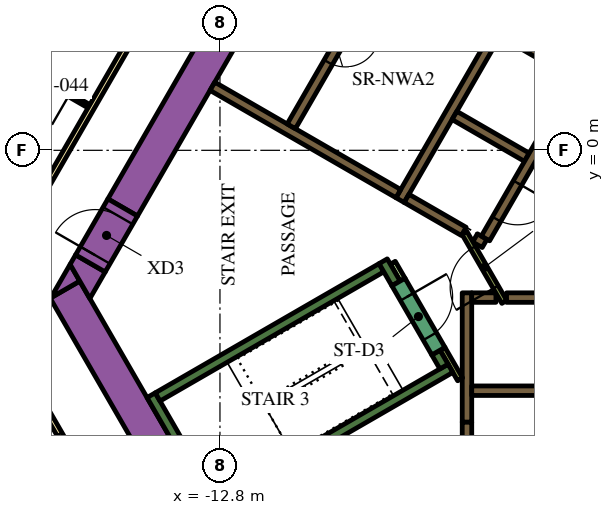
"""IFC4 building model, lengths in metres.
Left out: names, types, materials, properties, quantities, classifications, styles, units other than length and angle.
Written with IfcOpenShell. Run it as: python <this file> out.ifc"""

import sys

from ifc_helpers import new_model, si_unit, direction, frame, frame_2d, origin, place, context, subcontext, project, spatial, polyline, rectangle, outline, extrude, element, fill, save


model = new_model("IFC4")
c1 = context("Model", 3, precision=1e-05, world=origin(), true_north=direction((0.0, 1.0)))
c2 = subcontext(c1, "Body", "Model", "MODEL_VIEW")
j1 = project(units=[si_unit("LENGTHUNIT", "METRE"), si_unit("PLANEANGLEUNIT", "RADIAN")], contexts=[c1])
p1 = place(None, origin())
s1 = spatial("IfcSite", under=j1, at=p1, CompositionType="ELEMENT")
p2 = place(p1, origin())
s2 = spatial("IfcBuilding", under=s1, at=p2, CompositionType="ELEMENT")
p3 = place(p2, frame((0.0, 0.0, 51.0)))
s3 = spatial("IfcBuildingStorey", under=s2, at=p3, CompositionType="ELEMENT", Elevation=51.0)
p4 = place(p3, frame((-15.36, -1.503, 0.0), z_axis=(0.0, 0.0, 1.0), x_axis=(0.50000389221, 0.866023156604, 0.0)))
e1 = element("IfcWall", 1, at=p4, inside=s3, PredefinedType="SOLIDWALL", context=c2, shape_type="SweptSolid", body=[
    extrude(rectangle(XDim=21.0, YDim=0.9, at=frame_2d((10.5, 0.0))), origin(), (0.0, 0.0, 1.0), 3.9),
])
p5 = place(p3, frame((-12.134, -11.883, 0.0), z_axis=(0.0, 0.0, 1.0), x_axis=(-0.500005339912, 0.866022320763, 0.0)))
e2 = element("IfcWall", 2, at=p5, inside=s3, PredefinedType="SOLIDWALL", context=c2, shape_type="SweptSolid", body=[
    extrude(rectangle(XDim=9.488, YDim=0.9, at=frame_2d((4.744, 0.0))), origin(), (0.0, 0.0, 1.0), 3.9),
])
p6 = place(p3, origin())
e3 = element("IfcWall", 3, at=p6, inside=s3, PredefinedType="SOLIDWALL", context=c2, shape_type="SweptSolid", body=[
    extrude(outline(polyline([(-16.489, -3.44), (-17.251, -3.88), (-16.743, -3.0), (-16.489, -3.44)])), origin(), (0.0, 0.0, 1.0), 3.9),
])
e4 = element("IfcWall", 4, at=p6, inside=s3, PredefinedType="SOLIDWALL", context=c2, shape_type="SweptSolid", body=[
    extrude(outline(polyline([(-15.82, -3.201), (-16.223, -3.9), (-16.743, -3.0), (-16.599, -2.751), (-15.82, -3.201)])), origin(), (0.0, 0.0, 1.0), 3.9),
])
p7 = place(p3, frame((-12.885, -9.431, 0.0), z_axis=(0.0, 0.0, 1.0), x_axis=(-0.500020560727, 0.866013532718, 0.0)))
e5 = element("IfcWall", 5, at=p7, inside=s3, PredefinedType="SOLIDWALL", context=c2, shape_type="SweptSolid", body=[
    extrude(rectangle(XDim=3.45, YDim=0.25, at=frame_2d((1.725, 0.0))), origin(), (0.0, 0.0, 1.0), 3.9),
])
p8 = place(p3, frame((-14.44, -6.49, 0.0), z_axis=(0.0, 0.0, 1.0), x_axis=(0.866022966069, 0.500004222222, 0.0)))
e6 = element("IfcWall", 6, at=p8, inside=s3, PredefinedType="SOLIDWALL", context=c2, shape_type="SweptSolid", body=[
    extrude(rectangle(XDim=6.8, YDim=0.25, at=frame_2d((3.4, 0.0))), origin(), (0.0, 0.0, 1.0), 3.9),
])
p9 = place(p3, frame((-8.168, -3.503, 0.0), z_axis=(0.0, 0.0, 1.0), x_axis=(-0.499952099219, 0.866053057547, 0.0)))
e7 = element("IfcWall", 7, at=p9, inside=s3, PredefinedType="SOLIDWALL", context=c2, shape_type="SweptSolid", body=[
    extrude(rectangle(XDim=0.675, YDim=0.25, at=frame_2d((0.337, 0.0))), origin(), (0.0, 0.0, 1.0), 3.9),
])
p10 = place(p3, frame((-12.84, -9.261, 0.0), z_axis=(0.0, 0.0, 1.0), x_axis=(0.866016039709, 0.500016218704, 0.0)))
e8 = element("IfcWall", 8, at=p10, inside=s3, PredefinedType="SOLIDWALL", context=c2, shape_type="SweptSolid", body=[
    extrude(rectangle(XDim=7.05, YDim=0.25, at=frame_2d((3.525, 0.0))), origin(), (0.0, 0.0, 1.0), 3.9),
])
p11 = place(p3, frame((-6.905, -5.69, 0.0), z_axis=(0.0, 0.0, 1.0), x_axis=(-0.500402024738, 0.865793170242, 0.0)))
e9 = element("IfcWall", 9, at=p11, inside=s3, PredefinedType="SOLIDWALL", context=c2, shape_type="SweptSolid", body=[
    extrude(rectangle(XDim=0.425, YDim=0.25, at=frame_2d((0.212, 0.0))), origin(), (0.0, 0.0, 1.0), 3.9),
])
p12 = place(p3, frame((-5.259, -3.875, 0.0), z_axis=(0.0, 0.0, 1.0), x_axis=(1.0, 0.0, 0.0)))
e10 = element("IfcWall", 10, at=p12, inside=s3, PredefinedType="SOLIDWALL", context=c2, shape_type="SweptSolid", body=[
    extrude(rectangle(XDim=10.489, YDim=0.25, at=frame_2d((5.244, 0.0))), origin(), (0.0, 0.0, 1.0), 3.9),
])
p13 = place(p3, frame((-6.3, -3.75, 0.0), z_axis=(0.0, 0.0, 1.0), x_axis=(0.0, -1.0, 0.0)))
e11 = element("IfcWall", 11, at=p13, inside=s3, PredefinedType="SOLIDWALL", context=c2, shape_type="SweptSolid", body=[
    extrude(rectangle(XDim=3.404, YDim=0.25, at=frame_2d((1.702, 0.0))), origin(), (0.0, 0.0, 1.0), 3.9),
])
p14 = place(p3, frame((-6.175, -3.875, 0.0), z_axis=(0.0, 0.0, 1.0), x_axis=(1.0, 0.0, 0.0)))
e12 = element("IfcWall", 12, at=p14, inside=s3, PredefinedType="SOLIDWALL", context=c2, shape_type="SweptSolid", body=[
    extrude(rectangle(XDim=0.637, YDim=0.25, at=frame_2d((0.318, 0.0))), origin(), (0.0, 0.0, 1.0), 3.9),
])
p15 = place(p3, frame((-8.06, -1.311, 0.0), z_axis=(0.0, 0.0, 1.0), x_axis=(0.50000273126, 0.866023826885, 0.0)))
e13 = element("IfcWall", 13, at=p15, inside=s3, PredefinedType="SOLIDWALL", context=c2, shape_type="SweptSolid", body=[
    extrude(rectangle(XDim=10.33, YDim=0.25, at=frame_2d((5.165, 0.0))), origin(), (0.0, 0.0, 1.0), 3.9),
])
for number, where, z_axis, x_axis in (
    (14, (-5.369, 3.1, 0.0), (0.0, 0.0, 1.0), (0.866, -0.5, 0.0)),
    (15, (-4.724, -0.182, 0.0), (0.0, 0.0, 1.0), (-0.866, 0.5, 0.0)),
):
    element("IfcWall", number, at=place(p3, frame(where, z_axis=z_axis, x_axis=x_axis)), inside=s3, PredefinedType="SOLIDWALL", context=c2, shape_type="SweptSolid", body=[
        extrude(rectangle(XDim=2.2, YDim=0.25, at=frame_2d((1.1, 0.0))), origin(), (0.0, 0.0, 1.0), 3.9),
    ])
p16 = place(p3, frame((-6.088, -2.305, 0.0), z_axis=(0.0, 0.0, 1.0), x_axis=(0.866059450854, -0.499941024108, 0.0)))
e16 = element("IfcWall", 16, at=p16, inside=s3, PredefinedType="SOLIDWALL", context=c2, shape_type="SweptSolid", body=[
    extrude(rectangle(XDim=0.29, YDim=0.25, at=frame_2d((0.145, 0.0))), origin(), (0.0, 0.0, 1.0), 3.9),
])
p17 = place(p3, frame((-7.889, -1.265, 0.0), z_axis=(0.0, 0.0, 1.0), x_axis=(0.865986741702, -0.500066958712, 0.0)))
e17 = element("IfcWall", 17, at=p17, inside=s3, PredefinedType="SOLIDWALL", context=c2, shape_type="SweptSolid", body=[
    extrude(rectangle(XDim=1.738, YDim=0.25, at=frame_2d((0.869, 0.0))), origin(), (0.0, 0.0, 1.0), 3.9),
])
p18 = place(p3, frame((-8.106, -1.14, 0.0), z_axis=(0.0, 0.0, 1.0), x_axis=(-0.866000643155, 0.500042884217, 0.0)))
e18 = element("IfcWall", 18, at=p18, inside=s3, PredefinedType="SOLIDWALL", context=c2, shape_type="SweptSolid", body=[
    extrude(rectangle(XDim=5.65, YDim=0.25, at=frame_2d((2.825, 0.0))), origin(), (0.0, 0.0, 1.0), 3.9),
])
p19 = place(p3, frame((-6.48, -6.027, 0.0), z_axis=(0.0, 0.0, 1.0), x_axis=(-0.499927229454, 0.866067413802, 0.0)))
e19 = element("IfcWall", 19, at=p19, inside=s3, PredefinedType="PARTITIONING", context=c2, shape_type="SweptSolid", body=[
    extrude(rectangle(XDim=0.929, YDim=0.15, at=frame_2d((0.464, 0.0))), origin(), (0.0, 0.0, 1.0), 3.9),
])
p20 = place(p3, frame((-8.252, -2.958, 0.0), z_axis=(0.0, 0.0, 1.0), x_axis=(0.500174715838, -0.865924508047, 0.0)))
e20 = element("IfcWall", 20, at=p20, inside=s3, PredefinedType="PARTITIONING", context=c2, shape_type="SweptSolid", body=[
    extrude(rectangle(XDim=0.514, YDim=0.15, at=frame_2d((0.257, 0.0))), origin(), (0.0, 0.0, 1.0), 2.75),
])
p21 = place(p3, frame((-6.175, -6.325, 0.0), z_axis=(0.0, 0.0, 1.0), x_axis=(1.0, 0.0, 0.0)))
e21 = element("IfcWall", 21, at=p21, inside=s3, PredefinedType="SOLIDWALL", context=c2, shape_type="SweptSolid", body=[
    extrude(rectangle(XDim=12.35, YDim=0.25, at=frame_2d((6.175, 0.0))), origin(), (0.0, 0.0, 1.0), 3.9),
])
p22 = place(p21, frame((3.205, 0.0, 0.0)))
e22 = element("IfcOpeningElement", 22, at=p22, cuts=e21, PredefinedType="OPENING", context=c2, shape_type="SweptSolid", body=[
    extrude(rectangle(XDim=0.9, YDim=2.1, at=frame_2d((0.45, 1.05))), frame((0.0, 0.135, 0.0), z_axis=(0.0, -1.0, 0.0), x_axis=(1.0, 0.0, 0.0)), (0.0, 0.0, 1.0), 0.27),
])
p23 = place(p21, frame((8.145, 0.0, 0.0)))
e23 = element("IfcOpeningElement", 23, at=p23, cuts=e21, PredefinedType="OPENING", context=c2, shape_type="SweptSolid", body=[
    extrude(rectangle(XDim=1.1, YDim=2.1, at=frame_2d((0.55, 1.05))), frame((0.0, 0.135, 0.0), z_axis=(0.0, -1.0, 0.0), x_axis=(1.0, 0.0, 0.0)), (0.0, 0.0, 1.0), 0.27),
])
p24 = place(p21, frame((10.665, 0.0, 0.0)))
e24 = element("IfcOpeningElement", 24, at=p24, cuts=e21, PredefinedType="OPENING", context=c2, shape_type="SweptSolid", body=[
    extrude(rectangle(XDim=1.1, YDim=2.1, at=frame_2d((0.55, 1.05))), frame((0.0, 0.135, 0.0), z_axis=(0.0, -1.0, 0.0), x_axis=(1.0, 0.0, 0.0)), (0.0, 0.0, 1.0), 0.27),
])
p25 = place(p3, frame((-6.008, 9.144, 0.0), z_axis=(0.0, 0.0, 1.0), x_axis=(-0.500006956611, -0.866021387346, 0.0)))
e25 = element("IfcWall", 25, at=p25, inside=s3, PredefinedType="SOLIDWALL", context=c2, shape_type="SweptSolid", body=[
    extrude(rectangle(XDim=9.83, YDim=0.25, at=frame_2d((4.915, 0.0))), origin(), (0.0, 0.0, 1.0), 3.9),
])
p26 = place(p25, frame((6.985, 0.0, 0.0)))
e26 = element("IfcOpeningElement", 26, at=p26, cuts=e25, PredefinedType="OPENING", context=c2, shape_type="SweptSolid", body=[
    extrude(rectangle(XDim=0.9, YDim=2.1, at=frame_2d((0.45, 1.05))), frame((0.0, 0.135, 0.0), z_axis=(0.0, -1.0, 0.0), x_axis=(1.0, 0.0, 0.0)), (0.0, 0.0, 1.0), 0.27),
])
p27 = place(p3, frame((-0.898, 6.194, 0.0), z_axis=(0.0, 0.0, 1.0), x_axis=(-0.499996202215, -0.866027596426, 0.0)))
e27 = element("IfcWall", 27, at=p27, inside=s3, PredefinedType="SOLIDWALL", context=c2, shape_type="SweptSolid", body=[
    extrude(rectangle(XDim=9.83, YDim=0.25, at=frame_2d((4.915, 0.0))), origin(), (0.0, 0.0, 1.0), 3.9),
])
p28 = place(p27, frame((0.585, 0.0, 0.0)))
e28 = element("IfcOpeningElement", 28, at=p28, cuts=e27, PredefinedType="OPENING", context=c2, shape_type="SweptSolid", body=[
    extrude(rectangle(XDim=1.1, YDim=2.1, at=frame_2d((0.55, 1.05))), frame((0.0, 0.135, 0.0), z_axis=(0.0, -1.0, 0.0), x_axis=(1.0, 0.0, 0.0)), (0.0, 0.0, 1.0), 0.27),
])
p29 = place(p27, frame((3.105, 0.0, 0.0)))
e29 = element("IfcOpeningElement", 29, at=p29, cuts=e27, PredefinedType="OPENING", context=c2, shape_type="SweptSolid", body=[
    extrude(rectangle(XDim=1.1, YDim=2.1, at=frame_2d((0.55, 1.05))), frame((0.0, 0.135, 0.0), z_axis=(0.0, -1.0, 0.0), x_axis=(1.0, 0.0, 0.0)), (0.0, 0.0, 1.0), 0.27),
])
p30 = place(p27, frame((5.625, 0.0, 0.0)))
e30 = element("IfcOpeningElement", 30, at=p30, cuts=e27, PredefinedType="OPENING", context=c2, shape_type="SweptSolid", body=[
    extrude(rectangle(XDim=1.1, YDim=2.1, at=frame_2d((0.55, 1.05))), frame((0.0, 0.135, 0.0), z_axis=(0.0, -1.0, 0.0), x_axis=(1.0, 0.0, 0.0)), (0.0, 0.0, 1.0), 0.27),
])
p31 = place(p27, frame((8.145, 0.0, 0.0)))
e31 = element("IfcOpeningElement", 31, at=p31, cuts=e27, PredefinedType="OPENING", context=c2, shape_type="SweptSolid", body=[
    extrude(rectangle(XDim=1.1, YDim=2.1, at=frame_2d((0.55, 1.05))), frame((0.0, 0.135, 0.0), z_axis=(0.0, -1.0, 0.0), x_axis=(1.0, 0.0, 0.0)), (0.0, 0.0, 1.0), 0.27),
])
p32 = place(p3, frame((-8.103, -3.466, 0.0), z_axis=(0.0, 0.0, 1.0), x_axis=(0.500078061341, -0.865980330357, 0.0)))
e32 = element("IfcWall", 32, at=p32, inside=s3, PredefinedType="SOLIDWALL", context=c2, shape_type="SweptSolid", body=[
    extrude(rectangle(XDim=2.1, YDim=0.4, at=frame_2d((1.05, 0.0))), origin(), (0.0, 0.0, 1.0), 3.9),
])
p33 = place(p32, frame((0.45, 0.0, 0.0)))
e33 = element("IfcOpeningElement", 33, at=p33, cuts=e32, PredefinedType="OPENING", context=c2, shape_type="SweptSolid", body=[
    extrude(rectangle(XDim=1.2, YDim=2.1, at=frame_2d((0.6, 1.05))), frame((0.0, 0.21, 0.0), z_axis=(0.0, -1.0, 0.0), x_axis=(1.0, 0.0, 0.0)), (0.0, 0.0, 1.0), 0.42),
])
p34 = place(p3, frame((-6.3, -7.154, 0.0), z_axis=(0.0, 0.0, 1.0), x_axis=(0.0, -1.0, 0.0)))
e34 = element("IfcWall", 34, at=p34, inside=s3, PredefinedType="SOLIDWALL", context=c2, shape_type="SweptSolid", body=[
    extrude(rectangle(XDim=1.8, YDim=0.25, at=frame_2d((0.9, 0.0))), origin(), (0.0, 0.0, 1.0), 3.9),
])
p35 = place(p34, frame((0.45, 0.0, 0.0)))
e35 = element("IfcOpeningElement", 35, at=p35, cuts=e34, PredefinedType="OPENING", context=c2, shape_type="SweptSolid", body=[
    extrude(rectangle(XDim=0.9, YDim=2.1, at=frame_2d((0.45, 1.05))), frame((0.0, 0.135, 0.0), z_axis=(0.0, -1.0, 0.0), x_axis=(1.0, 0.0, 0.0)), (0.0, 0.0, 1.0), 0.27),
])
p36 = place(p3, frame((-5.317, -3.99, 0.0), z_axis=(0.0, 0.0, 1.0), x_axis=(-0.500027713859, 0.866009402589, 0.0)))
e36 = element("IfcWall", 36, at=p36, inside=s3, PredefinedType="PARTITIONING", context=c2, shape_type="SweptSolid", body=[
    extrude(rectangle(XDim=2.1, YDim=0.15, at=frame_2d((1.05, 0.0))), origin(), (0.0, 0.0, 1.0), 3.9),
])
p37 = place(p36, frame((0.45, 0.0, 0.0)))
e37 = element("IfcOpeningElement", 37, at=p37, cuts=e36, PredefinedType="OPENING", context=c2, shape_type="SweptSolid", body=[
    extrude(rectangle(XDim=1.2, YDim=2.1, at=frame_2d((0.6, 1.05))), frame((0.0, 0.085, 0.0), z_axis=(0.0, -1.0, 0.0), x_axis=(1.0, 0.0, 0.0)), (0.0, 0.0, 1.0), 0.17),
])
p38 = place(p3, frame((-16.209, -2.976, 0.0), z_axis=(0.0, 0.0, 1.0), x_axis=(0.499954529098, 0.86605165483, 0.0)))
e38 = element("IfcWall", 38, at=p38, inside=s3, PredefinedType="SOLIDWALL", context=c2, shape_type="SweptSolid", body=[
    extrude(rectangle(XDim=1.7, YDim=0.9, at=frame_2d((0.85, 0.0))), origin(), (0.0, 0.0, 1.0), 3.9),
])
p39 = place(p38, frame((0.25, 0.0, 0.0)))
e39 = element("IfcOpeningElement", 39, at=p39, cuts=e38, PredefinedType="OPENING", context=c2, shape_type="SweptSolid", body=[
    extrude(rectangle(XDim=1.2, YDim=2.1, at=frame_2d((0.6, 1.05))), frame((0.0, 0.46, 0.0), z_axis=(0.0, -1.0, 0.0), x_axis=(1.0, 0.0, 0.0)), (0.0, 0.0, 1.0), 0.92),
])
p40 = place(p3, frame((-19.081, -3.9, 0.0), z_axis=(0.0, 0.0, 1.0), x_axis=(0.499998313975, 0.866026377209, 0.0)))
e40 = element("IfcWall", 40, at=p40, inside=s3, PredefinedType="PARTITIONING", context=c2, shape_type="SweptSolid", body=[
    extrude(rectangle(XDim=25.766, YDim=0.15, at=frame_2d((12.883, 0.0))), origin(), (0.0, 0.0, 1.0), 2.75),
])
p41 = place(p40, frame((22.445, 0.0, 0.0)))
e41 = element("IfcOpeningElement", 41, at=p41, cuts=e40, PredefinedType="OPENING", context=c2, shape_type="SweptSolid", body=[
    extrude(rectangle(XDim=1.0, YDim=2.1, at=frame_2d((0.5, 1.05))), frame((0.0, 0.085, 0.0), z_axis=(0.0, -1.0, 0.0), x_axis=(1.0, 0.0, 0.0)), (0.0, 0.0, 1.0), 0.17),
])
p42 = place(p40, frame((21.138, 0.0, 0.0)))
e42 = element("IfcOpeningElement", 42, at=p42, cuts=e40, PredefinedType="OPENING", context=c2, shape_type="SweptSolid", body=[
    extrude(rectangle(XDim=1.0, YDim=2.1, at=frame_2d((0.5, 1.05))), frame((0.0, 0.085, 0.0), z_axis=(0.0, -1.0, 0.0), x_axis=(1.0, 0.0, 0.0)), (0.0, 0.0, 1.0), 0.17),
])
p43 = place(p40, frame((14.066, 0.0, 0.0)))
e43 = element("IfcOpeningElement", 43, at=p43, cuts=e40, PredefinedType="OPENING", context=c2, shape_type="SweptSolid", body=[
    extrude(rectangle(XDim=0.9, YDim=2.1, at=frame_2d((0.45, 1.05))), frame((0.0, 0.085, 0.0), z_axis=(0.0, -1.0, 0.0), x_axis=(1.0, 0.0, 0.0)), (0.0, 0.0, 1.0), 0.17),
])
p44 = place(p40, frame((11.693, 0.0, 0.0)))
e44 = element("IfcOpeningElement", 44, at=p44, cuts=e40, PredefinedType="OPENING", context=c2, shape_type="SweptSolid", body=[
    extrude(rectangle(XDim=1.0, YDim=2.1, at=frame_2d((0.5, 1.05))), frame((0.0, 0.085, 0.0), z_axis=(0.0, -1.0, 0.0), x_axis=(1.0, 0.0, 0.0)), (0.0, 0.0, 1.0), 0.17),
])
p45 = place(p3, frame((-16.412, -8.523, 0.0), z_axis=(0.0, 0.0, 1.0), x_axis=(-0.500001929737, 0.866024289647, 0.0)))
e45 = element("IfcWall", 45, at=p45, inside=s3, PredefinedType="PARTITIONING", context=c2, shape_type="SweptSolid", body=[
    extrude(rectangle(XDim=5.268, YDim=0.15, at=frame_2d((2.634, 0.0))), origin(), (0.0, 0.0, 1.0), 2.75),
])
p46 = place(p45, frame((0.226, 0.0, 0.0)))
e46 = element("IfcOpeningElement", 46, at=p46, cuts=e45, PredefinedType="OPENING", context=c2, shape_type="SweptSolid", body=[
    extrude(rectangle(XDim=1.0, YDim=2.1, at=frame_2d((0.5, 1.05))), frame((0.0, 0.085, 0.0), z_axis=(0.0, -1.0, 0.0), x_axis=(1.0, 0.0, 0.0)), (0.0, 0.0, 1.0), 0.17),
])
p47 = place(p3, frame((-16.247, 1.159, 0.0), z_axis=(0.0, 0.0, 1.0), x_axis=(-0.866059108428, 0.4999416173, 0.0)))
e47 = element("IfcWall", 47, at=p47, inside=s3, PredefinedType="PARTITIONING", context=c2, shape_type="SweptSolid", body=[
    extrude(rectangle(XDim=2.7, YDim=0.1, at=frame_2d((1.35, 0.0))), origin(), (0.0, 0.0, 1.0), 2.75),
])
p48 = place(p47, frame((0.6, 0.0, 0.0)))
e48 = element("IfcOpeningElement", 48, at=p48, cuts=e47, PredefinedType="OPENING", context=c2, shape_type="SweptSolid", body=[
    extrude(rectangle(XDim=0.9, YDim=2.1, at=frame_2d((0.45, 1.05))), frame((0.0, 0.06, 0.0), z_axis=(0.0, -1.0, 0.0), x_axis=(1.0, 0.0, 0.0)), (0.0, 0.0, 1.0), 0.12),
])
p49 = place(p26, origin())
e49 = element("IfcDoor", 49, at=p49, inside=s3, OperationType="SINGLE_SWING_LEFT", PredefinedType="DOOR", context=c2, shape_type="SweptSolid", body=[
    extrude(rectangle(XDim=0.9, YDim=2.1, at=frame_2d((0.45, 1.05))), frame((0.0, 0.025, 0.0), z_axis=(0.0, -1.0, 0.0), x_axis=(1.0, 0.0, 0.0)), (0.0, 0.0, 1.0), 0.05),
])
fill(e26, e49)
p50 = place(p31, origin())
e50 = element("IfcDoor", 50, at=p50, inside=s3, OperationType="DOUBLE_DOOR_SLIDING", PredefinedType="DOOR", context=c2, shape_type="SweptSolid", body=[
    extrude(rectangle(XDim=1.1, YDim=2.1, at=frame_2d((0.55, 1.05))), frame((0.0, 0.025, 0.0), z_axis=(0.0, -1.0, 0.0), x_axis=(1.0, 0.0, 0.0)), (0.0, 0.0, 1.0), 0.05),
])
fill(e31, e50)
p51 = place(p33, origin())
e51 = element("IfcDoor", 51, at=p51, inside=s3, OperationType="SINGLE_SWING_LEFT", PredefinedType="DOOR", context=c2, shape_type="SweptSolid", body=[
    extrude(rectangle(XDim=1.2, YDim=2.1, at=frame_2d((0.6, 1.05))), frame((0.0, 0.025, 0.0), z_axis=(0.0, -1.0, 0.0), x_axis=(1.0, 0.0, 0.0)), (0.0, 0.0, 1.0), 0.05),
])
fill(e33, e51)
p52 = place(p37, origin())
e52 = element("IfcDoor", 52, at=p52, inside=s3, OperationType="SINGLE_SWING_LEFT", PredefinedType="DOOR", context=c2, shape_type="SweptSolid", body=[
    extrude(rectangle(XDim=1.2, YDim=2.1, at=frame_2d((0.6, 1.05))), frame((0.0, 0.025, 0.0), z_axis=(0.0, -1.0, 0.0), x_axis=(1.0, 0.0, 0.0)), (0.0, 0.0, 1.0), 0.05),
])
fill(e37, e52)
p53 = place(p39, origin())
e53 = element("IfcDoor", 53, at=p53, inside=s3, OperationType="SINGLE_SWING_LEFT", PredefinedType="DOOR", context=c2, shape_type="SweptSolid", body=[
    extrude(rectangle(XDim=1.2, YDim=2.1, at=frame_2d((0.6, 1.05))), frame((0.0, 0.025, 0.0), z_axis=(0.0, -1.0, 0.0), x_axis=(1.0, 0.0, 0.0)), (0.0, 0.0, 1.0), 0.05),
])
fill(e39, e53)
p54 = place(p48, origin())
e54 = element("IfcDoor", 54, at=p54, inside=s3, OperationType="SINGLE_SWING_LEFT", PredefinedType="DOOR", context=c2, shape_type="SweptSolid", body=[
    extrude(rectangle(XDim=0.9, YDim=2.1, at=frame_2d((0.45, 1.05))), frame((0.0, 0.025, 0.0), z_axis=(0.0, -1.0, 0.0), x_axis=(1.0, 0.0, 0.0)), (0.0, 0.0, 1.0), 0.05),
])
fill(e48, e54)
p55 = place(p46, origin())
e55 = element("IfcDoor", 55, at=p55, inside=s3, OperationType="SINGLE_SWING_LEFT", PredefinedType="DOOR", context=c2, shape_type="SweptSolid", body=[
    extrude(rectangle(XDim=1.0, YDim=2.1, at=frame_2d((0.5, 1.05))), frame((0.0, 0.025, 0.0), z_axis=(0.0, -1.0, 0.0), x_axis=(1.0, 0.0, 0.0)), (0.0, 0.0, 1.0), 0.05),
])
fill(e46, e55)
save(model, sys.argv[1])
